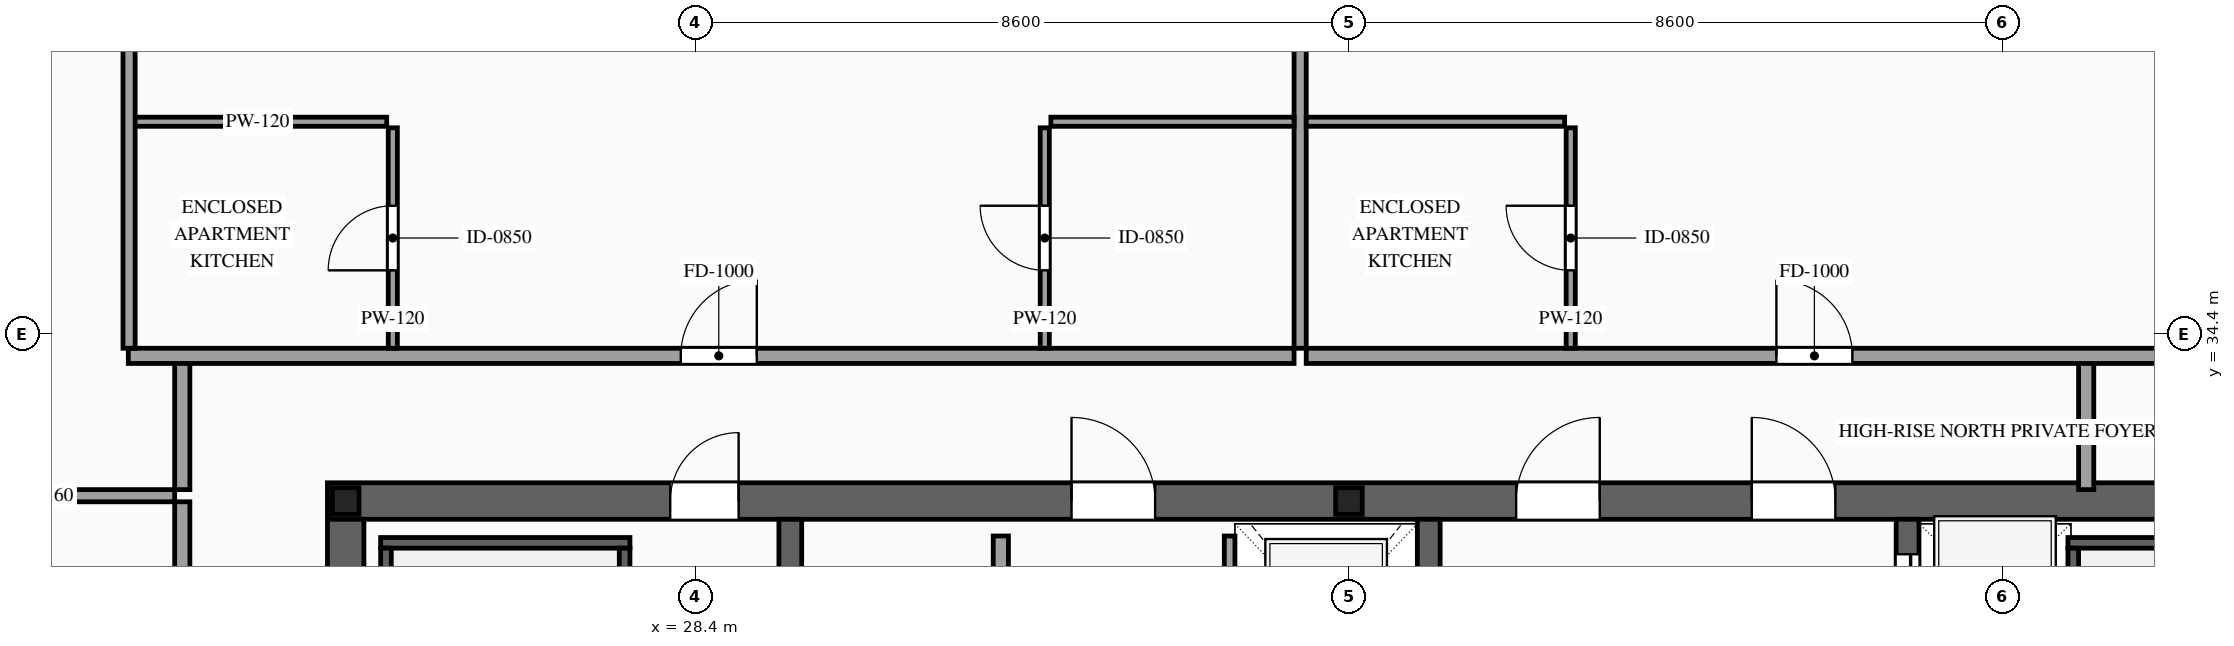
"""IFC4 building model, lengths in metres.
Left out: names, types, materials, properties, quantities, classifications, styles, units other than length and angle.
Written with IfcOpenShell. Run it as: python <this file> out.ifc"""

import sys

from ifc_helpers import new_model, si_unit, direction, frame, frame_2d, origin, origin_2d, place, context, subcontext, project, spatial, rectangle, i_section, extrude, source, transform, mapped, element, fill, save


model = new_model("IFC4")
c1 = context("Model", 3, precision=1e-05, world=origin(), true_north=direction((0.0, 1.0)))
c2 = subcontext(c1, "Body", "Model", "MODEL_VIEW")
j1 = project(units=[si_unit("LENGTHUNIT", "METRE"), si_unit("PLANEANGLEUNIT", "RADIAN")], contexts=[c1])
p1 = place(None, origin())
s1 = spatial("IfcSite", under=j1, at=p1, CompositionType="ELEMENT")
p2 = place(p1, origin())
s2 = spatial("IfcBuilding", under=s1, at=p2, CompositionType="ELEMENT")
p3 = place(p2, frame((0.0, 0.0, 328.7)))
s3 = spatial("IfcBuildingStorey", under=s2, at=p3, CompositionType="ELEMENT", Elevation=328.7)
p4 = place(p3, frame((23.56, 32.2, 0.0), z_axis=(0.0, 0.0, 1.0), x_axis=(1.0, 0.0, 0.0)))
e1 = element("IfcWall", 1, at=p4, inside=s3, PredefinedType="SHEAR", context=c2, shape_type="SweptSolid", body=[
    extrude(rectangle(XDim=26.88, YDim=0.48, at=frame_2d((13.44, 0.0))), origin(), (0.0, 0.0, 1.0), 3.5),
])
p5 = place(p4, frame((4.51, 0.0, 0.0)))
e2 = element("IfcOpeningElement", 2, at=p5, cuts=e1, PredefinedType="OPENING", context=c2, shape_type="SweptSolid", body=[
    extrude(rectangle(XDim=0.9, YDim=2.15, at=frame_2d((0.45, 1.075))), frame((0.0, 0.255, 0.0), z_axis=(0.0, -1.0, 0.0), x_axis=(1.0, 0.0, 0.0)), (0.0, 0.0, 1.0), 0.51),
])
p6 = place(p4, frame((9.79, 0.0, 0.0)))
e3 = element("IfcOpeningElement", 3, at=p6, cuts=e1, PredefinedType="OPENING", context=c2, shape_type="SweptSolid", body=[
    extrude(rectangle(XDim=1.1, YDim=2.2, at=frame_2d((0.55, 1.1))), frame((0.0, 0.255, 0.0), z_axis=(0.0, -1.0, 0.0), x_axis=(1.0, 0.0, 0.0)), (0.0, 0.0, 1.0), 0.51),
])
p7 = place(p4, frame((15.64, 0.0, 0.0)))
e4 = element("IfcOpeningElement", 4, at=p7, cuts=e1, PredefinedType="OPENING", context=c2, shape_type="SweptSolid", body=[
    extrude(rectangle(XDim=1.1, YDim=2.2, at=frame_2d((0.55, 1.1))), frame((0.0, 0.255, 0.0), z_axis=(0.0, -1.0, 0.0), x_axis=(1.0, 0.0, 0.0)), (0.0, 0.0, 1.0), 0.51),
])
p8 = place(p4, frame((18.74, 0.0, 0.0)))
e5 = element("IfcOpeningElement", 5, at=p8, cuts=e1, PredefinedType="OPENING", context=c2, shape_type="SweptSolid", body=[
    extrude(rectangle(XDim=1.1, YDim=2.2, at=frame_2d((0.55, 1.1))), frame((0.0, 0.255, 0.0), z_axis=(0.0, -1.0, 0.0), x_axis=(1.0, 0.0, 0.0)), (0.0, 0.0, 1.0), 0.51),
])
m1 = source(origin(), c2, "Body", "SweptSolid", [
    extrude(rectangle(XDim=12.32, YDim=0.48, at=frame_2d((6.16, 0.0))), origin(), (0.0, 0.0, 1.0), 3.5),
])
p9 = place(p3, frame((23.8, 19.64, 0.0), z_axis=(0.0, 0.0, 1.0), x_axis=(0.0, 1.0, 0.0)))
e6 = element("IfcWall", 6, at=p9, inside=s3, PredefinedType="SHEAR", context=c2, shape_type="MappedRepresentation", body=[
    mapped(m1, transform((0.0, 0.0, 0.0), scale=1.0)),
])
m2 = source(origin(), c2, "Body", "SweptSolid", [
    extrude(rectangle(XDim=12.32, YDim=0.3, at=frame_2d((6.16, 0.0))), origin(), (0.0, 0.0, 1.0), 3.5),
])
for number, where, z_axis, x_axis in (
    (7, (29.65, 19.64, 0.0), (0.0, 0.0, 1.0), (0.0, 1.0, 0.0)),
    (8, (38.05, 19.64, 0.0), (0.0, 0.0, 1.0), (0.0, 1.0, 0.0)),
):
    element("IfcWall", number, at=place(p3, frame(where, z_axis=z_axis, x_axis=x_axis)), inside=s3, PredefinedType="SOLIDWALL", context=c2, shape_type="MappedRepresentation", body=[
        mapped(m2, transform((0.0, 0.0, 0.0), scale=1.0)),
    ])
p10 = place(p3, frame((44.35, 19.64, 0.0), z_axis=(0.0, 0.0, 1.0), x_axis=(0.0, 1.0, 0.0)))
e9 = element("IfcWall", 9, at=p10, inside=s3, PredefinedType="SOLIDWALL", context=c2, shape_type="SweptSolid", body=[
    extrude(rectangle(XDim=12.32, YDim=0.3, at=frame_2d((6.16, 0.0))), origin(), (0.0, 0.0, 1.0), 3.5),
])
p11 = place(p10, frame((6.56, 0.0, 0.0)))
e10 = element("IfcOpeningElement", 10, at=p11, cuts=e9, PredefinedType="OPENING", context=c2, shape_type="SweptSolid", body=[
    extrude(rectangle(XDim=1.1, YDim=2.2, at=frame_2d((0.55, 1.1))), frame((0.0, 0.165, 0.0), z_axis=(0.0, -1.0, 0.0), x_axis=(1.0, 0.0, 0.0)), (0.0, 0.0, 1.0), 0.33),
])
p12 = place(p10, frame((8.66, 0.0, 0.0)))
e11 = element("IfcOpeningElement", 11, at=p12, cuts=e9, PredefinedType="OPENING", context=c2, shape_type="SweptSolid", body=[
    extrude(rectangle(XDim=1.1, YDim=2.2, at=frame_2d((0.55, 1.1))), frame((0.0, 0.165, 0.0), z_axis=(0.0, -1.0, 0.0), x_axis=(1.0, 0.0, 0.0)), (0.0, 0.0, 1.0), 0.33),
])
p13 = place(p10, frame((10.76, 0.0, 0.0)))
e12 = element("IfcOpeningElement", 12, at=p13, cuts=e9, PredefinedType="OPENING", context=c2, shape_type="SweptSolid", body=[
    extrude(rectangle(XDim=1.1, YDim=2.2, at=frame_2d((0.55, 1.1))), frame((0.0, 0.165, 0.0), z_axis=(0.0, -1.0, 0.0), x_axis=(1.0, 0.0, 0.0)), (0.0, 0.0, 1.0), 0.33),
])
m3 = source(origin(), c2, "Body", "SweptSolid", [
    extrude(i_section(OverallWidth=0.35, OverallDepth=0.35, WebThickness=0.012, FlangeThickness=0.019, at=origin_2d()), origin(), (0.0, 0.0, 1.0), 3.5),
])
for number, where, z_axis, x_axis in (
    (13, (23.8, 32.2, 0.0), (0.0, 0.0, 1.0), (1.0, 0.0, 0.0)),
    (14, (37.0, 32.2, 0.0), (0.0, 0.0, 1.0), (1.0, 0.0, 0.0)),
):
    element("IfcColumn", number, at=place(p3, frame(where, z_axis=z_axis, x_axis=x_axis)), inside=s3, PredefinedType="COLUMN", context=c2, shape_type="MappedRepresentation", body=[
        mapped(m3, transform((0.0, 0.0, 0.0), scale=1.0)),
    ])
p14 = place(p3, frame((35.43, 29.4, 0.0), z_axis=(0.0, 0.0, 1.0), x_axis=(0.0, 1.0, 0.0)))
e15 = element("IfcWall", 15, at=p14, inside=s3, PredefinedType="SOLIDWALL", context=c2, shape_type="SweptSolid", body=[
    extrude(rectangle(XDim=2.34, YDim=0.14, at=frame_2d((1.17, 0.0))), origin(), (0.0, 0.0, 1.0), 3.28),
])
p15 = place(p14, frame((0.62, 0.0, 0.0)))
e16 = element("IfcOpeningElement", 16, at=p15, cuts=e15, PredefinedType="OPENING", context=c2, shape_type="SweptSolid", body=[
    extrude(rectangle(XDim=1.1, YDim=2.2, at=frame_2d((0.55, 1.1))), frame((0.0, 0.085, 0.0), z_axis=(0.0, -1.0, 0.0), x_axis=(1.0, 0.0, 0.0)), (0.0, 0.0, 1.0), 0.17),
])
m4 = source(origin(), c2, "Body", "SweptSolid", [
    extrude(rectangle(XDim=3.28, YDim=0.14, at=frame_2d((1.64, 0.0))), origin(), (0.0, 0.0, 1.0), 3.28),
])
p16 = place(p3, frame((24.26, 31.65, 0.0), z_axis=(0.0, 0.0, 1.0), x_axis=(1.0, 0.0, 0.0)))
e17 = element("IfcWall", 17, at=p16, inside=s3, PredefinedType="SOLIDWALL", context=c2, shape_type="MappedRepresentation", body=[
    mapped(m4, transform((0.0, 0.0, 0.0), scale=1.0)),
])
m5 = source(origin(), c2, "Body", "SweptSolid", [
    extrude(rectangle(XDim=8.94, YDim=0.14, at=frame_2d((4.47, 0.0))), origin(), (0.0, 0.0, 1.0), 3.28),
])
for number, where, z_axis, x_axis in (
    (18, (24.33, 22.64, 0.0), (0.0, 0.0, 1.0), (0.0, 1.0, 0.0)),
    (19, (27.47, 22.64, 0.0), (0.0, 0.0, 1.0), (0.0, 1.0, 0.0)),
):
    element("IfcWall", number, at=place(p3, frame(where, z_axis=z_axis, x_axis=x_axis)), inside=s3, PredefinedType="SOLIDWALL", context=c2, shape_type="MappedRepresentation", body=[
        mapped(m5, transform((0.0, 0.0, 0.0), scale=1.0)),
    ])
p17 = place(p3, frame((46.46, 31.65, 0.0), z_axis=(0.0, 0.0, 1.0), x_axis=(1.0, 0.0, 0.0)))
e20 = element("IfcWall", 20, at=p17, inside=s3, PredefinedType="SOLIDWALL", context=c2, shape_type="MappedRepresentation", body=[
    mapped(m4, transform((0.0, 0.0, 0.0), scale=1.0)),
])
p18 = place(p3, frame((46.53, 22.64, 0.0), z_axis=(0.0, 0.0, 1.0), x_axis=(0.0, 1.0, 0.0)))
e21 = element("IfcWall", 21, at=p18, inside=s3, PredefinedType="SOLIDWALL", context=c2, shape_type="MappedRepresentation", body=[
    mapped(m5, transform((0.0, 0.0, 0.0), scale=1.0)),
])
p19 = place(p3, frame((32.42, 19.86, 0.0), z_axis=(0.0, 0.0, 1.0), x_axis=(0.0, 1.0, 0.0)))
e22 = element("IfcWall", 22, at=p19, inside=s3, PredefinedType="PARTITIONING", context=c2, shape_type="SweptSolid", body=[
    extrude(rectangle(XDim=11.88, YDim=0.2, at=frame_2d((5.94, 0.0))), origin(), (0.0, 0.0, 1.0), 3.28),
])
p20 = place(p19, frame((5.49, 0.0, 0.0)))
e23 = element("IfcOpeningElement", 23, at=p20, cuts=e22, PredefinedType="OPENING", context=c2, shape_type="SweptSolid", body=[
    extrude(rectangle(XDim=0.9, YDim=2.15, at=frame_2d((0.45, 1.075))), frame((0.0, 0.115, 0.0), z_axis=(0.0, -1.0, 0.0), x_axis=(1.0, 0.0, 0.0)), (0.0, 0.0, 1.0), 0.23),
])
m6 = source(origin(), c2, "Body", "SweptSolid", [
    extrude(rectangle(XDim=1.7, YDim=0.2, at=frame_2d((0.85, 0.0))), origin(), (0.0, 0.0, 1.0), 3.28),
])
for number, where, z_axis, x_axis in (
    (24, (21.65, 32.35, 0.0), (0.0, 0.0, 1.0), (0.0, 1.0, 0.0)),
    (25, (46.7, 32.35, 0.0), (0.0, 0.0, 1.0), (0.0, 1.0, 0.0)),
):
    element("IfcWall", number, at=place(p3, frame(where, z_axis=z_axis, x_axis=x_axis)), inside=s3, PredefinedType="PARTITIONING", context=c2, shape_type="MappedRepresentation", body=[
        mapped(m6, transform((0.0, 0.0, 0.0), scale=1.0)),
    ])
p21 = place(p3, frame((20.94, 34.11, 0.0), z_axis=(0.0, 0.0, 1.0), x_axis=(1.0, 0.0, 0.0)))
e26 = element("IfcWall", 26, at=p21, inside=s3, PredefinedType="PARTITIONING", context=c2, shape_type="SweptSolid", body=[
    extrude(rectangle(XDim=15.338, YDim=0.2, at=frame_2d((7.669, 0.0))), origin(), (0.0, 0.0, 1.0), 3.28),
])
p22 = place(p21, frame((7.269, 0.0, 0.0)))
e27 = element("IfcOpeningElement", 27, at=p22, cuts=e26, PredefinedType="OPENING", context=c2, shape_type="SweptSolid", body=[
    extrude(rectangle(XDim=1.0, YDim=2.2, at=frame_2d((0.5, 1.1))), frame((0.0, 0.115, 0.0), z_axis=(0.0, -1.0, 0.0), x_axis=(1.0, 0.0, 0.0)), (0.0, 0.0, 1.0), 0.23),
])
m7 = source(origin(), c2, "Body", "SweptSolid", [
    extrude(rectangle(XDim=10.54, YDim=0.16, at=frame_2d((5.27, 0.0))), origin(), (0.0, 0.0, 1.0), 3.28),
])
p23 = place(p3, frame((36.358, 34.21, 0.0), z_axis=(0.0, 0.0, 1.0), x_axis=(0.0, 1.0, 0.0)))
e28 = element("IfcWall", 28, at=p23, inside=s3, PredefinedType="PARTITIONING", context=c2, shape_type="MappedRepresentation", body=[
    mapped(m7, transform((0.0, 0.0, 0.0), scale=1.0)),
])
m8 = source(origin(), c2, "Body", "SweptSolid", [
    extrude(rectangle(XDim=3.4, YDim=0.12, at=frame_2d((1.7, 0.0))), origin(), (0.0, 0.0, 1.0), 3.28),
])
p24 = place(p3, frame((20.94, 37.19, 0.0), z_axis=(0.0, 0.0, 1.0), x_axis=(1.0, 0.0, 0.0)))
e29 = element("IfcWall", 29, at=p24, inside=s3, PredefinedType="PARTITIONING", context=c2, shape_type="MappedRepresentation", body=[
    mapped(m8, transform((0.0, 0.0, 0.0), scale=1.0)),
])
p25 = place(p3, frame((24.42, 34.21, 0.0), z_axis=(0.0, 0.0, 1.0), x_axis=(0.0, 1.0, 0.0)))
e30 = element("IfcWall", 30, at=p25, inside=s3, PredefinedType="PARTITIONING", context=c2, shape_type="SweptSolid", body=[
    extrude(rectangle(XDim=2.9, YDim=0.12, at=frame_2d((1.45, 0.0))), origin(), (0.0, 0.0, 1.0), 3.28),
])
p26 = place(p25, frame((1.025, 0.0, 0.0)))
e31 = element("IfcOpeningElement", 31, at=p26, cuts=e30, PredefinedType="OPENING", context=c2, shape_type="SweptSolid", body=[
    extrude(rectangle(XDim=0.85, YDim=2.1, at=frame_2d((0.425, 1.05))), frame((0.0, 0.075, 0.0), z_axis=(0.0, -1.0, 0.0), x_axis=(1.0, 0.0, 0.0)), (0.0, 0.0, 1.0), 0.15),
])
m9 = source(origin(), c2, "Body", "SweptSolid", [
    extrude(rectangle(XDim=3.2, YDim=0.12, at=frame_2d((1.6, 0.0))), origin(), (0.0, 0.0, 1.0), 3.28),
])
p27 = place(p3, frame((33.078, 37.19, 0.0), z_axis=(0.0, 0.0, 1.0), x_axis=(1.0, 0.0, 0.0)))
e32 = element("IfcWall", 32, at=p27, inside=s3, PredefinedType="PARTITIONING", context=c2, shape_type="MappedRepresentation", body=[
    mapped(m9, transform((0.0, 0.0, 0.0), scale=1.0)),
])
p28 = place(p3, frame((32.998, 34.21, 0.0), z_axis=(0.0, 0.0, 1.0), x_axis=(0.0, 1.0, 0.0)))
e33 = element("IfcWall", 33, at=p28, inside=s3, PredefinedType="PARTITIONING", context=c2, shape_type="SweptSolid", body=[
    extrude(rectangle(XDim=2.9, YDim=0.12, at=frame_2d((1.45, 0.0))), origin(), (0.0, 0.0, 1.0), 3.28),
])
p29 = place(p28, frame((1.025, 0.0, 0.0)))
e34 = element("IfcOpeningElement", 34, at=p29, cuts=e33, PredefinedType="OPENING", context=c2, shape_type="SweptSolid", body=[
    extrude(rectangle(XDim=0.85, YDim=2.1, at=frame_2d((0.425, 1.05))), frame((0.0, 0.075, 0.0), z_axis=(0.0, -1.0, 0.0), x_axis=(1.0, 0.0, 0.0)), (0.0, 0.0, 1.0), 0.15),
])
p30 = place(p3, frame((36.438, 34.11, 0.0), z_axis=(0.0, 0.0, 1.0), x_axis=(1.0, 0.0, 0.0)))
e35 = element("IfcWall", 35, at=p30, inside=s3, PredefinedType="PARTITIONING", context=c2, shape_type="SweptSolid", body=[
    extrude(rectangle(XDim=16.622, YDim=0.2, at=frame_2d((8.311, 0.0))), origin(), (0.0, 0.0, 1.0), 3.28),
])
p31 = place(p30, frame((6.186, 0.0, 0.0)))
e36 = element("IfcOpeningElement", 36, at=p31, cuts=e35, PredefinedType="OPENING", context=c2, shape_type="SweptSolid", body=[
    extrude(rectangle(XDim=1.0, YDim=2.2, at=frame_2d((0.5, 1.1))), frame((0.0, 0.115, 0.0), z_axis=(0.0, -1.0, 0.0), x_axis=(1.0, 0.0, 0.0)), (0.0, 0.0, 1.0), 0.23),
])
m10 = source(origin(), c2, "Body", "SweptSolid", [
    extrude(rectangle(XDim=10.39, YDim=0.16, at=frame_2d((5.195, 0.0))), origin(), (0.0, 0.0, 1.0), 3.28),
])
p32 = place(p3, frame((20.95, 34.21, 0.0), z_axis=(0.0, 0.0, 1.0), x_axis=(0.0, 1.0, 0.0)))
e37 = element("IfcWall", 37, at=p32, inside=s3, PredefinedType="PARTITIONING", context=c2, shape_type="MappedRepresentation", body=[
    mapped(m10, transform((0.0, 0.0, 0.0), scale=1.0)),
])
m11 = source(origin(), c2, "Body", "SweptSolid", [
    extrude(rectangle(XDim=3.4, YDim=0.12, at=frame_2d((1.7, 0.0))), origin(), (0.0, 0.0, 1.0), 3.28),
])
p33 = place(p3, frame((36.438, 37.19, 0.0), z_axis=(0.0, 0.0, 1.0), x_axis=(1.0, 0.0, 0.0)))
e38 = element("IfcWall", 38, at=p33, inside=s3, PredefinedType="PARTITIONING", context=c2, shape_type="MappedRepresentation", body=[
    mapped(m11, transform((0.0, 0.0, 0.0), scale=1.0)),
])
p34 = place(p3, frame((39.918, 34.21, 0.0), z_axis=(0.0, 0.0, 1.0), x_axis=(0.0, 1.0, 0.0)))
e39 = element("IfcWall", 39, at=p34, inside=s3, PredefinedType="PARTITIONING", context=c2, shape_type="SweptSolid", body=[
    extrude(rectangle(XDim=2.9, YDim=0.12, at=frame_2d((1.45, 0.0))), origin(), (0.0, 0.0, 1.0), 3.28),
])
p35 = place(p34, frame((1.025, 0.0, 0.0)))
e40 = element("IfcOpeningElement", 40, at=p35, cuts=e39, PredefinedType="OPENING", context=c2, shape_type="SweptSolid", body=[
    extrude(rectangle(XDim=0.85, YDim=2.1, at=frame_2d((0.425, 1.05))), frame((0.0, 0.075, 0.0), z_axis=(0.0, -1.0, 0.0), x_axis=(1.0, 0.0, 0.0)), (0.0, 0.0, 1.0), 0.15),
])
p36 = place(p3, frame((21.65, 19.41, 0.0), z_axis=(0.0, 0.0, 1.0), x_axis=(0.0, 1.0, 0.0)))
e41 = element("IfcWall", 41, at=p36, inside=s3, PredefinedType="PARTITIONING", context=c2, shape_type="SweptSolid", body=[
    extrude(rectangle(XDim=12.78, YDim=0.2, at=frame_2d((6.39, 0.0))), origin(), (0.0, 0.0, 1.0), 3.28),
])
p37 = place(p36, frame((5.89, 0.0, 0.0)))
e42 = element("IfcOpeningElement", 42, at=p37, cuts=e41, PredefinedType="OPENING", context=c2, shape_type="SweptSolid", body=[
    extrude(rectangle(XDim=1.0, YDim=2.2, at=frame_2d((0.5, 1.1))), frame((0.0, 0.115, 0.0), z_axis=(0.0, -1.0, 0.0), x_axis=(1.0, 0.0, 0.0)), (0.0, 0.0, 1.0), 0.23),
])
m12 = source(origin(), c2, "Body", "SweptSolid", [
    extrude(rectangle(XDim=3.5, YDim=0.16, at=frame_2d((1.75, 0.0))), origin(), (0.0, 0.0, 1.0), 2.825),
])
p38 = place(p3, frame((18.05, 32.27, 0.0), z_axis=(0.0, 0.0, 1.0), x_axis=(1.0, 0.0, 0.0)))
e43 = element("IfcWall", 43, at=p38, inside=s3, PredefinedType="PARTITIONING", context=c2, shape_type="MappedRepresentation", body=[
    mapped(m12, transform((0.0, 0.0, 0.0), scale=1.0)),
])
m13 = source(origin(), c2, "Body", "SweptSolid", [
    extrude(rectangle(XDim=1.1, YDim=2.2, at=frame_2d((0.55, 1.1))), frame((0.0, 0.025, 0.0), z_axis=(0.0, -1.0, 0.0), x_axis=(1.0, 0.0, 0.0)), (0.0, 0.0, 1.0), 0.05),
])
p39 = place(p13, origin())
e44 = element("IfcDoor", 44, at=p39, inside=s3, OperationType="SLIDING_TO_LEFT", PredefinedType="DOOR", context=c2, shape_type="MappedRepresentation", body=[
    mapped(m13, transform((0.0, 0.0, 0.0), scale=1.0)),
])
fill(e12, e44)
m14 = source(origin(), c2, "Body", "SweptSolid", [
    extrude(rectangle(XDim=0.9, YDim=2.15, at=frame_2d((0.45, 1.075))), frame((0.0, 0.025, 0.0), z_axis=(0.0, -1.0, 0.0), x_axis=(1.0, 0.0, 0.0)), (0.0, 0.0, 1.0), 0.05),
])
p40 = place(p5, origin())
e45 = element("IfcDoor", 45, at=p40, inside=s3, OperationType="SINGLE_SWING_RIGHT", PredefinedType="DOOR", context=c2, shape_type="MappedRepresentation", body=[
    mapped(m14, transform((0.0, 0.0, 0.0), scale=1.0)),
])
fill(e2, e45)
m15 = source(origin(), c2, "Body", "SweptSolid", [
    extrude(rectangle(XDim=1.1, YDim=2.2, at=frame_2d((0.55, 1.1))), frame((0.0, 0.025, 0.0), z_axis=(0.0, -1.0, 0.0), x_axis=(1.0, 0.0, 0.0)), (0.0, 0.0, 1.0), 0.05),
])
p41 = place(p6, origin())
e46 = element("IfcDoor", 46, at=p41, inside=s3, OperationType="SINGLE_SWING_LEFT", PredefinedType="DOOR", context=c2, shape_type="MappedRepresentation", body=[
    mapped(m15, transform((0.0, 0.0, 0.0), scale=1.0)),
])
fill(e3, e46)
p42 = place(p7, origin())
e47 = element("IfcDoor", 47, at=p42, inside=s3, OperationType="SINGLE_SWING_RIGHT", PredefinedType="DOOR", context=c2, shape_type="MappedRepresentation", body=[
    mapped(m15, transform((0.0, 0.0, 0.0), scale=1.0)),
])
fill(e4, e47)
p43 = place(p8, origin())
e48 = element("IfcDoor", 48, at=p43, inside=s3, OperationType="SINGLE_SWING_LEFT", PredefinedType="DOOR", context=c2, shape_type="MappedRepresentation", body=[
    mapped(m15, transform((0.0, 0.0, 0.0), scale=1.0)),
])
fill(e5, e48)
m16 = source(origin(), c2, "Body", "SweptSolid", [
    extrude(rectangle(XDim=1.0, YDim=2.2, at=frame_2d((0.5, 1.1))), frame((0.0, 0.025, 0.0), z_axis=(0.0, -1.0, 0.0), x_axis=(1.0, 0.0, 0.0)), (0.0, 0.0, 1.0), 0.05),
])
p44 = place(p22, origin())
e49 = element("IfcDoor", 49, at=p44, inside=s3, OperationType="SINGLE_SWING_RIGHT", PredefinedType="DOOR", context=c2, shape_type="MappedRepresentation", body=[
    mapped(m16, transform((0.0, 0.0, 0.0), scale=1.0)),
])
fill(e27, e49)
m17 = source(origin(), c2, "Body", "SweptSolid", [
    extrude(rectangle(XDim=0.85, YDim=2.1, at=frame_2d((0.425, 1.05))), frame((0.0, 0.025, 0.0), z_axis=(0.0, -1.0, 0.0), x_axis=(1.0, 0.0, 0.0)), (0.0, 0.0, 1.0), 0.05),
])
p45 = place(p26, origin())
e50 = element("IfcDoor", 50, at=p45, inside=s3, OperationType="SINGLE_SWING_LEFT", PredefinedType="DOOR", context=c2, shape_type="MappedRepresentation", body=[
    mapped(m17, transform((0.0, 0.0, 0.0), scale=1.0)),
])
fill(e31, e50)
p46 = place(p29, origin())
e51 = element("IfcDoor", 51, at=p46, inside=s3, OperationType="SINGLE_SWING_RIGHT", PredefinedType="DOOR", context=c2, shape_type="MappedRepresentation", body=[
    mapped(m17, transform((0.0, 0.0, 0.0), scale=1.0)),
])
fill(e34, e51)
p47 = place(p31, origin())
e52 = element("IfcDoor", 52, at=p47, inside=s3, OperationType="SINGLE_SWING_LEFT", PredefinedType="DOOR", context=c2, shape_type="MappedRepresentation", body=[
    mapped(m16, transform((0.0, 0.0, 0.0), scale=1.0)),
])
fill(e36, e52)
p48 = place(p35, origin())
e53 = element("IfcDoor", 53, at=p48, inside=s3, OperationType="SINGLE_SWING_RIGHT", PredefinedType="DOOR", context=c2, shape_type="MappedRepresentation", body=[
    mapped(m17, transform((0.0, 0.0, 0.0), scale=1.0)),
])
fill(e40, e53)
save(model, sys.argv[1])
